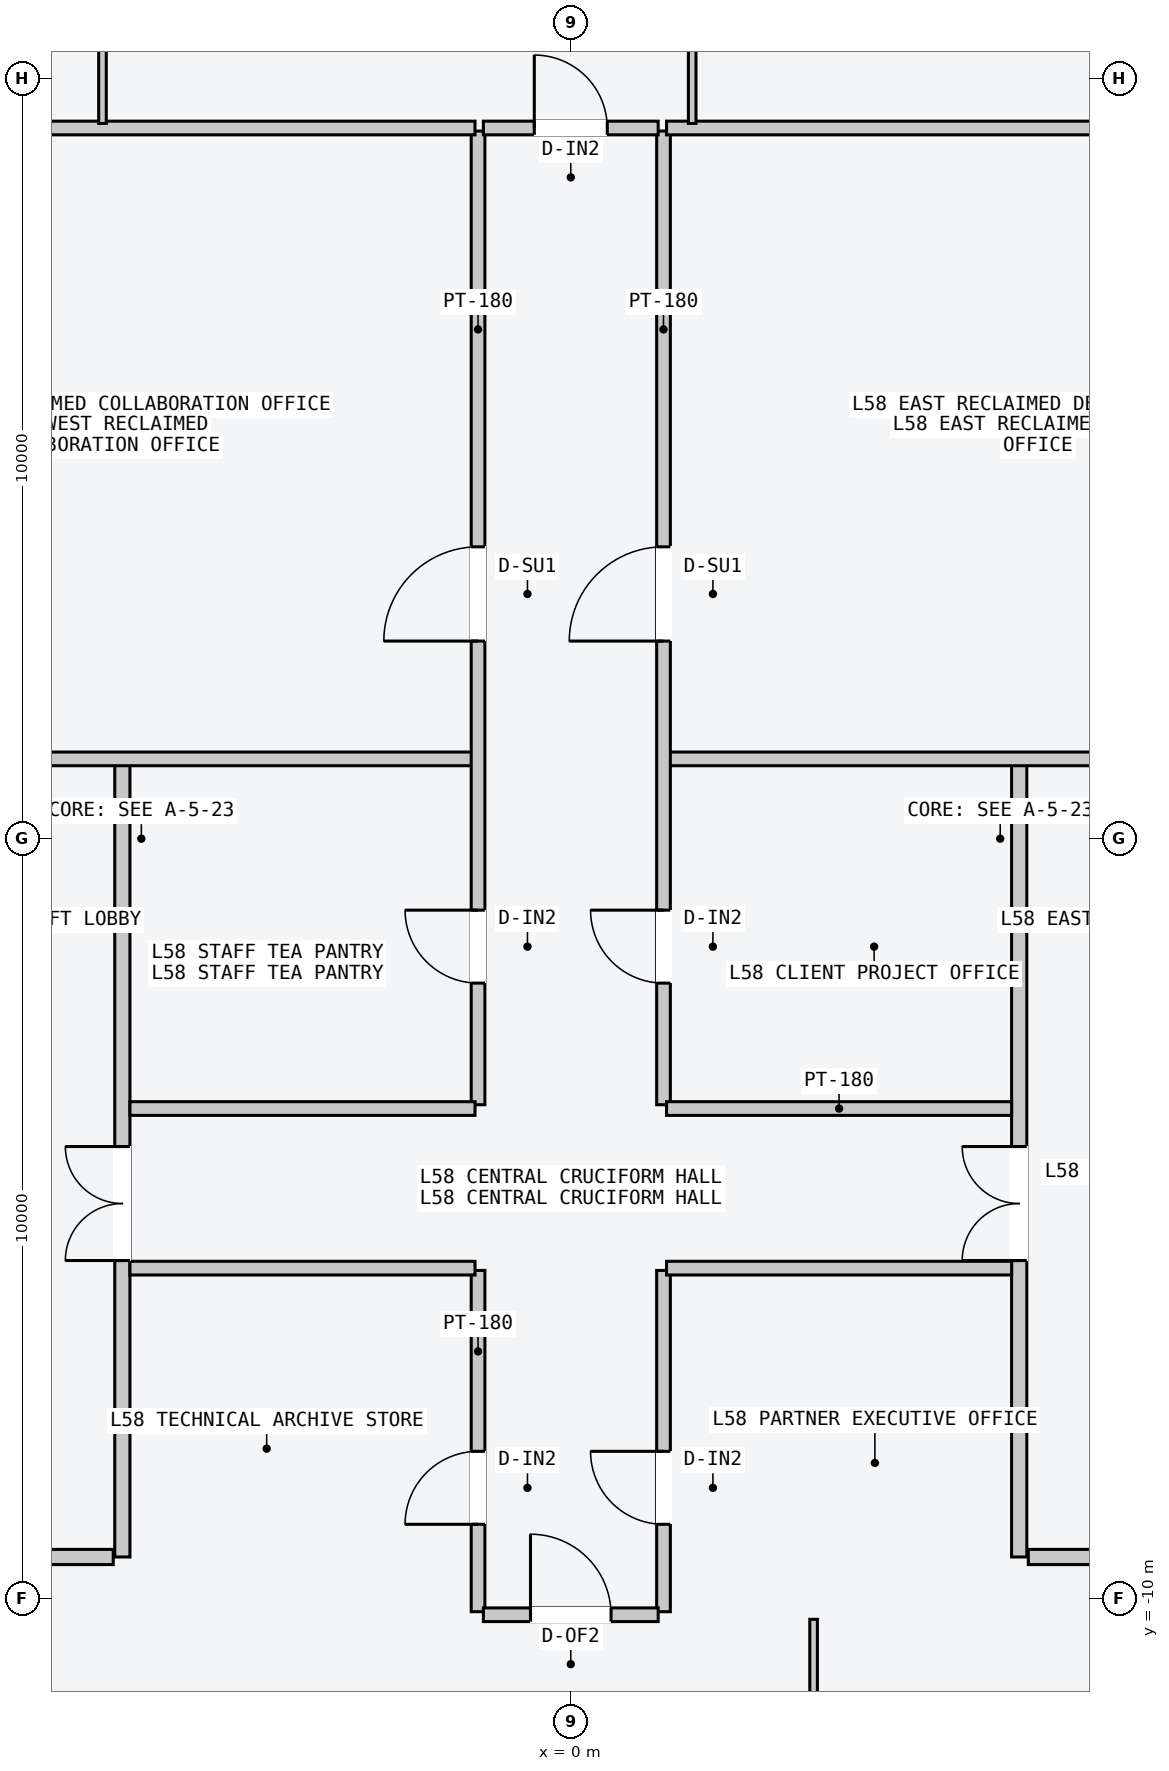
"""IFC4 building model, lengths in metres.
Left out: names, types, materials, properties, quantities, classifications, styles, units other than length and angle.
Written with IfcOpenShell. Run it as: python <this file> out.ifc"""

import sys

from ifc_helpers import new_model, si_unit, direction, frame, frame_2d, origin, place, context, subcontext, project, spatial, rectangle, extrude, element, fill, save


model = new_model("IFC4")
c1 = context("Model", 3, precision=1e-05, world=origin(), true_north=direction((0.0, 1.0)))
c2 = subcontext(c1, "Body", "Model", "MODEL_VIEW")
j1 = project(units=[si_unit("LENGTHUNIT", "METRE"), si_unit("PLANEANGLEUNIT", "RADIAN")], contexts=[c1])
p1 = place(None, origin())
s1 = spatial("IfcSite", under=j1, at=p1, CompositionType="ELEMENT")
p2 = place(p1, origin())
s2 = spatial("IfcBuilding", under=s1, at=p2, CompositionType="ELEMENT")
p3 = place(p2, frame((0.0, 0.0, 222.0)))
s3 = spatial("IfcBuildingStorey", under=s2, at=p3, CompositionType="ELEMENT", Elevation=222.0)
p4 = place(p3, frame((-5.9, -9.45, 0.0), z_axis=(0.0, 0.0, 1.0), x_axis=(0.0, 1.0, 0.0)))
e1 = element("IfcWall", 1, at=p4, inside=s3, PredefinedType="PARTITIONING", context=c2, shape_type="SweptSolid", body=[
    extrude(rectangle(XDim=10.5, YDim=0.2, at=frame_2d((5.25, 0.0))), origin(), (0.0, 0.0, 1.0), 3.4),
])
p5 = place(p4, frame((3.9, 0.0, 0.0)))
e2 = element("IfcOpeningElement", 2, at=p5, cuts=e1, PredefinedType="OPENING", context=c2, shape_type="SweptSolid", body=[
    extrude(rectangle(XDim=1.5, YDim=2.2, at=frame_2d((0.75, 1.1))), frame((0.0, 0.11, 0.0), z_axis=(0.0, -1.0, 0.0), x_axis=(1.0, 0.0, 0.0)), (0.0, 0.0, 1.0), 0.22),
])
p6 = place(p3, frame((-6.02, -9.45, 0.0), z_axis=(0.0, 0.0, 1.0), x_axis=(-1.0, 0.0, 0.0)))
e3 = element("IfcWall", 3, at=p6, inside=s3, PredefinedType="PARTITIONING", context=c2, shape_type="SweptSolid", body=[
    extrude(rectangle(XDim=1.8, YDim=0.2, at=frame_2d((0.9, 0.0))), origin(), (0.0, 0.0, 1.0), 3.4),
])
p7 = place(p3, frame((5.9, -9.45, 0.0), z_axis=(0.0, 0.0, 1.0), x_axis=(0.0, 1.0, 0.0)))
e4 = element("IfcWall", 4, at=p7, inside=s3, PredefinedType="PARTITIONING", context=c2, shape_type="SweptSolid", body=[
    extrude(rectangle(XDim=10.5, YDim=0.2, at=frame_2d((5.25, 0.0))), origin(), (0.0, 0.0, 1.0), 3.4),
])
p8 = place(p7, frame((3.9, 0.0, 0.0)))
e5 = element("IfcOpeningElement", 5, at=p8, cuts=e4, PredefinedType="OPENING", context=c2, shape_type="SweptSolid", body=[
    extrude(rectangle(XDim=1.5, YDim=2.2, at=frame_2d((0.75, 1.1))), frame((0.0, 0.11, 0.0), z_axis=(0.0, -1.0, 0.0), x_axis=(1.0, 0.0, 0.0)), (0.0, 0.0, 1.0), 0.22),
])
p9 = place(p3, frame((6.02, -9.45, 0.0), z_axis=(0.0, 0.0, 1.0), x_axis=(1.0, 0.0, 0.0)))
e6 = element("IfcWall", 6, at=p9, inside=s3, PredefinedType="PARTITIONING", context=c2, shape_type="SweptSolid", body=[
    extrude(rectangle(XDim=1.8, YDim=0.2, at=frame_2d((0.9, 0.0))), origin(), (0.0, 0.0, 1.0), 3.4),
])
p10 = place(p3, frame((-10.05, 1.05, 0.0), z_axis=(0.0, 0.0, 1.0), x_axis=(1.0, 0.0, 0.0)))
e7 = element("IfcWall", 7, at=p10, inside=s3, PredefinedType="PARTITIONING", context=c2, shape_type="SweptSolid", body=[
    extrude(rectangle(XDim=8.79, YDim=0.18, at=frame_2d((4.395, 0.0))), origin(), (0.0, 0.0, 1.0), 3.4),
])
p11 = place(p3, frame((-1.22, -3.5, 0.0), z_axis=(0.0, 0.0, 1.0), x_axis=(0.0, 1.0, 0.0)))
e8 = element("IfcWall", 8, at=p11, inside=s3, PredefinedType="PARTITIONING", context=c2, shape_type="SweptSolid", body=[
    extrude(rectangle(XDim=12.81, YDim=0.18, at=frame_2d((6.405, 0.0))), origin(), (0.0, 0.0, 1.0), 3.4),
])
p12 = place(p11, frame((6.1, 0.0, 0.0)))
e9 = element("IfcOpeningElement", 9, at=p12, cuts=e8, PredefinedType="OPENING", context=c2, shape_type="SweptSolid", body=[
    extrude(rectangle(XDim=1.24, YDim=2.24, at=frame_2d((0.62, 1.12))), frame((0.0, 0.1, 0.0), z_axis=(0.0, -1.0, 0.0), x_axis=(1.0, 0.0, 0.0)), (0.0, 0.0, 1.0), 0.2),
])
p13 = place(p11, frame((1.6, 0.0, 0.0)))
e10 = element("IfcOpeningElement", 10, at=p13, cuts=e8, PredefinedType="OPENING", context=c2, shape_type="SweptSolid", body=[
    extrude(rectangle(XDim=0.96, YDim=2.18, at=frame_2d((0.48, 1.09))), frame((0.0, 0.1, 0.0), z_axis=(0.0, -1.0, 0.0), x_axis=(1.0, 0.0, 0.0)), (0.0, 0.0, 1.0), 0.2),
])
p14 = place(p3, frame((-7.5, 9.35, 0.0), z_axis=(0.0, 0.0, 1.0), x_axis=(1.0, 0.0, 0.0)))
e11 = element("IfcWall", 11, at=p14, inside=s3, PredefinedType="PARTITIONING", context=c2, shape_type="SweptSolid", body=[
    extrude(rectangle(XDim=6.24, YDim=0.18, at=frame_2d((3.12, 0.0))), origin(), (0.0, 0.0, 1.0), 3.4),
])
p15 = place(p3, frame((-5.8, -3.55, 0.0), z_axis=(0.0, 0.0, 1.0), x_axis=(1.0, 0.0, 0.0)))
e12 = element("IfcWall", 12, at=p15, inside=s3, PredefinedType="PARTITIONING", context=c2, shape_type="SweptSolid", body=[
    extrude(rectangle(XDim=4.54, YDim=0.18, at=frame_2d((2.27, 0.0))), origin(), (0.0, 0.0, 1.0), 3.4),
])
p16 = place(p3, frame((1.26, 1.05, 0.0), z_axis=(0.0, 0.0, 1.0), x_axis=(1.0, 0.0, 0.0)))
e13 = element("IfcWall", 13, at=p16, inside=s3, PredefinedType="PARTITIONING", context=c2, shape_type="SweptSolid", body=[
    extrude(rectangle(XDim=8.8, YDim=0.18, at=frame_2d((4.4, 0.0))), origin(), (0.0, 0.0, 1.0), 3.4),
])
p17 = place(p3, frame((1.22, -3.5, 0.0), z_axis=(0.0, 0.0, 1.0), x_axis=(0.0, 1.0, 0.0)))
e14 = element("IfcWall", 14, at=p17, inside=s3, PredefinedType="PARTITIONING", context=c2, shape_type="SweptSolid", body=[
    extrude(rectangle(XDim=12.81, YDim=0.18, at=frame_2d((6.405, 0.0))), origin(), (0.0, 0.0, 1.0), 3.4),
])
p18 = place(p17, frame((6.1, 0.0, 0.0)))
e15 = element("IfcOpeningElement", 15, at=p18, cuts=e14, PredefinedType="OPENING", context=c2, shape_type="SweptSolid", body=[
    extrude(rectangle(XDim=1.24, YDim=2.24, at=frame_2d((0.62, 1.12))), frame((0.0, 0.1, 0.0), z_axis=(0.0, -1.0, 0.0), x_axis=(1.0, 0.0, 0.0)), (0.0, 0.0, 1.0), 0.2),
])
p19 = place(p17, frame((1.6, 0.0, 0.0)))
e16 = element("IfcOpeningElement", 16, at=p19, cuts=e14, PredefinedType="OPENING", context=c2, shape_type="SweptSolid", body=[
    extrude(rectangle(XDim=0.96, YDim=2.18, at=frame_2d((0.48, 1.09))), frame((0.0, 0.1, 0.0), z_axis=(0.0, -1.0, 0.0), x_axis=(1.0, 0.0, 0.0)), (0.0, 0.0, 1.0), 0.2),
])
p20 = place(p3, frame((1.26, 9.35, 0.0), z_axis=(0.0, 0.0, 1.0), x_axis=(1.0, 0.0, 0.0)))
e17 = element("IfcWall", 17, at=p20, inside=s3, PredefinedType="PARTITIONING", context=c2, shape_type="SweptSolid", body=[
    extrude(rectangle(XDim=6.24, YDim=0.18, at=frame_2d((3.12, 0.0))), origin(), (0.0, 0.0, 1.0), 3.4),
])
p21 = place(p3, frame((1.26, -3.55, 0.0), z_axis=(0.0, 0.0, 1.0), x_axis=(1.0, 0.0, 0.0)))
e18 = element("IfcWall", 18, at=p21, inside=s3, PredefinedType="PARTITIONING", context=c2, shape_type="SweptSolid", body=[
    extrude(rectangle(XDim=4.54, YDim=0.18, at=frame_2d((2.27, 0.0))), origin(), (0.0, 0.0, 1.0), 3.4),
])
p22 = place(p3, frame((-1.22, -10.17, 0.0), z_axis=(0.0, 0.0, 1.0), x_axis=(0.0, 1.0, 0.0)))
e19 = element("IfcWall", 19, at=p22, inside=s3, PredefinedType="PARTITIONING", context=c2, shape_type="SweptSolid", body=[
    extrude(rectangle(XDim=4.49, YDim=0.18, at=frame_2d((2.245, 0.0))), origin(), (0.0, 0.0, 1.0), 3.4),
])
p23 = place(p22, frame((1.15, 0.0, 0.0)))
e20 = element("IfcOpeningElement", 20, at=p23, cuts=e19, PredefinedType="OPENING", context=c2, shape_type="SweptSolid", body=[
    extrude(rectangle(XDim=0.96, YDim=2.18, at=frame_2d((0.48, 1.09))), frame((0.0, 0.1, 0.0), z_axis=(0.0, -1.0, 0.0), x_axis=(1.0, 0.0, 0.0)), (0.0, 0.0, 1.0), 0.2),
])
p24 = place(p3, frame((1.22, -10.17, 0.0), z_axis=(0.0, 0.0, 1.0), x_axis=(0.0, 1.0, 0.0)))
e21 = element("IfcWall", 21, at=p24, inside=s3, PredefinedType="PARTITIONING", context=c2, shape_type="SweptSolid", body=[
    extrude(rectangle(XDim=4.49, YDim=0.18, at=frame_2d((2.245, 0.0))), origin(), (0.0, 0.0, 1.0), 3.4),
])
p25 = place(p24, frame((1.15, 0.0, 0.0)))
e22 = element("IfcOpeningElement", 22, at=p25, cuts=e21, PredefinedType="OPENING", context=c2, shape_type="SweptSolid", body=[
    extrude(rectangle(XDim=0.96, YDim=2.18, at=frame_2d((0.48, 1.09))), frame((0.0, 0.1, 0.0), z_axis=(0.0, -1.0, 0.0), x_axis=(1.0, 0.0, 0.0)), (0.0, 0.0, 1.0), 0.2),
])
for number, where, z_axis, x_axis in (
    (23, (-5.8, -5.65, 0.0), (0.0, 0.0, 1.0), (1.0, 0.0, 0.0)),
    (24, (1.26, -5.65, 0.0), (0.0, 0.0, 1.0), (1.0, 0.0, 0.0)),
):
    element("IfcWall", number, at=place(p3, frame(where, z_axis=z_axis, x_axis=x_axis)), inside=s3, PredefinedType="PARTITIONING", context=c2, shape_type="SweptSolid", body=[
        extrude(rectangle(XDim=4.54, YDim=0.18, at=frame_2d((2.27, 0.0))), origin(), (0.0, 0.0, 1.0), 3.4),
    ])
p26 = place(p3, frame((-6.161, 9.41, 0.0), z_axis=(0.0, 0.0, 1.0), x_axis=(0.0, 1.0, 0.0)))
e25 = element("IfcWall", 25, at=p26, inside=s3, PredefinedType="PARTITIONING", context=c2, shape_type="SweptSolid", body=[
    extrude(rectangle(XDim=8.15, YDim=0.1, at=frame_2d((4.075, 0.0))), origin(), (0.0, 0.0, 1.0), 3.4),
])
p27 = place(p26, frame((1.15, 0.0, 0.0)))
e26 = element("IfcOpeningElement", 26, at=p27, cuts=e25, PredefinedType="OPENING", context=c2, shape_type="SweptSolid", body=[
    extrude(rectangle(XDim=0.96, YDim=2.18, at=frame_2d((0.48, 1.09))), frame((0.0, 0.06, 0.0), z_axis=(0.0, -1.0, 0.0), x_axis=(1.0, 0.0, 0.0)), (0.0, 0.0, 1.0), 0.12),
])
p28 = place(p3, frame((1.597, 9.41, 0.0), z_axis=(0.0, 0.0, 1.0), x_axis=(0.0, 1.0, 0.0)))
e27 = element("IfcWall", 27, at=p28, inside=s3, PredefinedType="PARTITIONING", context=c2, shape_type="SweptSolid", body=[
    extrude(rectangle(XDim=7.14, YDim=0.1, at=frame_2d((3.57, 0.0))), origin(), (0.0, 0.0, 1.0), 3.4),
])
p29 = place(p28, frame((1.15, 0.0, 0.0)))
e28 = element("IfcOpeningElement", 28, at=p29, cuts=e27, PredefinedType="OPENING", context=c2, shape_type="SweptSolid", body=[
    extrude(rectangle(XDim=0.96, YDim=2.18, at=frame_2d((0.48, 1.09))), frame((0.0, 0.06, 0.0), z_axis=(0.0, -1.0, 0.0), x_axis=(1.0, 0.0, 0.0)), (0.0, 0.0, 1.0), 0.12),
])
p30 = place(p3, frame((-1.15, 9.35, 0.0), z_axis=(0.0, 0.0, 1.0), x_axis=(1.0, 0.0, 0.0)))
e29 = element("IfcWall", 29, at=p30, inside=s3, PredefinedType="PARTITIONING", context=c2, shape_type="SweptSolid", body=[
    extrude(rectangle(XDim=2.3, YDim=0.18, at=frame_2d((1.15, 0.0))), origin(), (0.0, 0.0, 1.0), 3.4),
])
p31 = place(p30, frame((0.67, 0.0, 0.0)))
e30 = element("IfcOpeningElement", 30, at=p31, cuts=e29, PredefinedType="OPENING", context=c2, shape_type="SweptSolid", body=[
    extrude(rectangle(XDim=0.96, YDim=2.18, at=frame_2d((0.48, 1.09))), frame((0.0, 0.1, 0.0), z_axis=(0.0, -1.0, 0.0), x_axis=(1.0, 0.0, 0.0)), (0.0, 0.0, 1.0), 0.2),
])
p32 = place(p3, frame((3.195, -17.56, 0.0), z_axis=(0.0, 0.0, 1.0), x_axis=(0.0, 1.0, 0.0)))
e31 = element("IfcWall", 31, at=p32, inside=s3, PredefinedType="PARTITIONING", context=c2, shape_type="SweptSolid", body=[
    extrude(rectangle(XDim=7.29, YDim=0.1, at=frame_2d((3.645, 0.0))), origin(), (0.0, 0.0, 1.0), 3.4),
])
p33 = place(p32, frame((1.05, 0.0, 0.0)))
e32 = element("IfcOpeningElement", 32, at=p33, cuts=e31, PredefinedType="OPENING", context=c2, shape_type="SweptSolid", body=[
    extrude(rectangle(XDim=0.96, YDim=2.18, at=frame_2d((0.48, 1.09))), frame((0.0, 0.06, 0.0), z_axis=(0.0, -1.0, 0.0), x_axis=(1.0, 0.0, 0.0)), (0.0, 0.0, 1.0), 0.12),
])
p34 = place(p3, frame((-1.15, -10.21, 0.0), z_axis=(0.0, 0.0, 1.0), x_axis=(1.0, 0.0, 0.0)))
e33 = element("IfcWall", 33, at=p34, inside=s3, PredefinedType="PARTITIONING", context=c2, shape_type="SweptSolid", body=[
    extrude(rectangle(XDim=2.3, YDim=0.18, at=frame_2d((1.15, 0.0))), origin(), (0.0, 0.0, 1.0), 3.4),
])
p35 = place(p34, frame((0.62, 0.0, 0.0)))
e34 = element("IfcOpeningElement", 34, at=p35, cuts=e33, PredefinedType="OPENING", context=c2, shape_type="SweptSolid", body=[
    extrude(rectangle(XDim=1.06, YDim=2.2, at=frame_2d((0.53, 1.1))), frame((0.0, 0.1, 0.0), z_axis=(0.0, -1.0, 0.0), x_axis=(1.0, 0.0, 0.0)), (0.0, 0.0, 1.0), 0.2),
])
p36 = place(p5, origin())
e35 = element("IfcDoor", 35, at=p36, inside=s3, OperationType="DOUBLE_DOOR_SINGLE_SWING", PredefinedType="DOOR", context=c2, shape_type="SweptSolid", body=[
    extrude(rectangle(XDim=1.5, YDim=2.2, at=frame_2d((0.75, 1.1))), frame((0.0, 0.025, 0.0), z_axis=(0.0, -1.0, 0.0), x_axis=(1.0, 0.0, 0.0)), (0.0, 0.0, 1.0), 0.05),
])
fill(e2, e35)
p37 = place(p8, origin())
e36 = element("IfcDoor", 36, at=p37, inside=s3, OperationType="DOUBLE_DOOR_SINGLE_SWING", PredefinedType="DOOR", context=c2, shape_type="SweptSolid", body=[
    extrude(rectangle(XDim=1.5, YDim=2.2, at=frame_2d((0.75, 1.1))), frame((0.0, 0.025, 0.0), z_axis=(0.0, -1.0, 0.0), x_axis=(1.0, 0.0, 0.0)), (0.0, 0.0, 1.0), 0.05),
])
fill(e5, e36)
p38 = place(p12, origin())
e37 = element("IfcDoor", 37, at=p38, inside=s3, OperationType="SINGLE_SWING_LEFT", PredefinedType="DOOR", context=c2, shape_type="SweptSolid", body=[
    extrude(rectangle(XDim=1.24, YDim=2.24, at=frame_2d((0.62, 1.12))), frame((0.0, 0.025, 0.0), z_axis=(0.0, -1.0, 0.0), x_axis=(1.0, 0.0, 0.0)), (0.0, 0.0, 1.0), 0.05),
])
fill(e9, e37)
p39 = place(p13, origin())
e38 = element("IfcDoor", 38, at=p39, inside=s3, OperationType="SINGLE_SWING_RIGHT", PredefinedType="DOOR", context=c2, shape_type="SweptSolid", body=[
    extrude(rectangle(XDim=0.96, YDim=2.18, at=frame_2d((0.48, 1.09))), frame((0.0, 0.025, 0.0), z_axis=(0.0, -1.0, 0.0), x_axis=(1.0, 0.0, 0.0)), (0.0, 0.0, 1.0), 0.05),
])
fill(e10, e38)
p40 = place(p18, origin())
e39 = element("IfcDoor", 39, at=p40, inside=s3, OperationType="SINGLE_SWING_LEFT", PredefinedType="DOOR", context=c2, shape_type="SweptSolid", body=[
    extrude(rectangle(XDim=1.24, YDim=2.24, at=frame_2d((0.62, 1.12))), frame((0.0, 0.025, 0.0), z_axis=(0.0, -1.0, 0.0), x_axis=(1.0, 0.0, 0.0)), (0.0, 0.0, 1.0), 0.05),
])
fill(e15, e39)
p41 = place(p19, origin())
e40 = element("IfcDoor", 40, at=p41, inside=s3, OperationType="SINGLE_SWING_RIGHT", PredefinedType="DOOR", context=c2, shape_type="SweptSolid", body=[
    extrude(rectangle(XDim=0.96, YDim=2.18, at=frame_2d((0.48, 1.09))), frame((0.0, 0.025, 0.0), z_axis=(0.0, -1.0, 0.0), x_axis=(1.0, 0.0, 0.0)), (0.0, 0.0, 1.0), 0.05),
])
fill(e16, e40)
p42 = place(p23, origin())
e41 = element("IfcDoor", 41, at=p42, inside=s3, OperationType="SINGLE_SWING_LEFT", PredefinedType="DOOR", context=c2, shape_type="SweptSolid", body=[
    extrude(rectangle(XDim=0.96, YDim=2.18, at=frame_2d((0.48, 1.09))), frame((0.0, 0.025, 0.0), z_axis=(0.0, -1.0, 0.0), x_axis=(1.0, 0.0, 0.0)), (0.0, 0.0, 1.0), 0.05),
])
fill(e20, e41)
p43 = place(p25, origin())
e42 = element("IfcDoor", 42, at=p43, inside=s3, OperationType="SINGLE_SWING_RIGHT", PredefinedType="DOOR", context=c2, shape_type="SweptSolid", body=[
    extrude(rectangle(XDim=0.96, YDim=2.18, at=frame_2d((0.48, 1.09))), frame((0.0, 0.025, 0.0), z_axis=(0.0, -1.0, 0.0), x_axis=(1.0, 0.0, 0.0)), (0.0, 0.0, 1.0), 0.05),
])
fill(e22, e42)
p44 = place(p31, origin())
e43 = element("IfcDoor", 43, at=p44, inside=s3, OperationType="SINGLE_SWING_LEFT", PredefinedType="DOOR", context=c2, shape_type="SweptSolid", body=[
    extrude(rectangle(XDim=0.96, YDim=2.18, at=frame_2d((0.48, 1.09))), frame((0.0, 0.025, 0.0), z_axis=(0.0, -1.0, 0.0), x_axis=(1.0, 0.0, 0.0)), (0.0, 0.0, 1.0), 0.05),
])
fill(e30, e43)
p45 = place(p35, origin())
e44 = element("IfcDoor", 44, at=p45, inside=s3, OperationType="SINGLE_SWING_LEFT", PredefinedType="DOOR", context=c2, shape_type="SweptSolid", body=[
    extrude(rectangle(XDim=1.06, YDim=2.2, at=frame_2d((0.53, 1.1))), frame((0.0, 0.025, 0.0), z_axis=(0.0, -1.0, 0.0), x_axis=(1.0, 0.0, 0.0)), (0.0, 0.0, 1.0), 0.05),
])
fill(e34, e44)
save(model, sys.argv[1])
